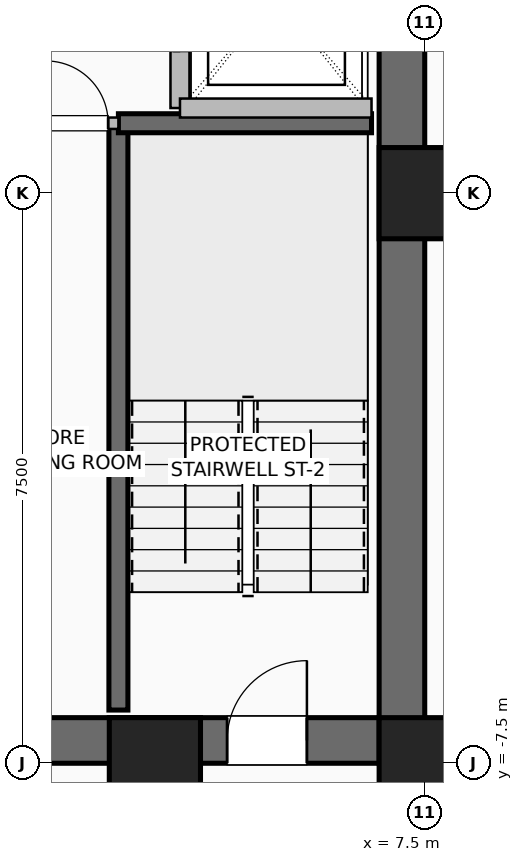
"""IFC4 building model, lengths in metres.
Left out: names, types, materials, properties, quantities, classifications, styles, units other than length and angle.
Written with IfcOpenShell. Run it as: python <this file> out.ifc"""

import sys

from ifc_helpers import new_model, si_unit, direction, frame, frame_2d, origin, origin_2d, place, context, subcontext, project, spatial, rectangle, hollow_rectangle, extrude, element, fill, save


model = new_model("IFC4")
c1 = context("Model", 3, precision=1e-05, world=origin(), true_north=direction((0.0, 1.0)))
c2 = subcontext(c1, "Body", "Model", "MODEL_VIEW")
j1 = project(units=[si_unit("LENGTHUNIT", "METRE"), si_unit("PLANEANGLEUNIT", "RADIAN")], contexts=[c1])
p1 = place(None, origin())
s1 = spatial("IfcSite", under=j1, at=p1, CompositionType="ELEMENT")
p2 = place(p1, origin())
s2 = spatial("IfcBuilding", under=s1, at=p2, CompositionType="ELEMENT")
p3 = place(p2, frame((0.0, 0.0, 44.5)))
s3 = spatial("IfcBuildingStorey", under=s2, at=p3, CompositionType="ELEMENT", Elevation=44.5)
for number, where, z_axis, x_axis in (
    (1, (3.95, -7.5, 0.0), (0.0, 0.0, 1.0), (1.0, 0.0, 0.0)),
    (2, (7.5, -7.5, 0.0), (0.0, 0.0, 1.0), (1.0, 0.0, 0.0)),
    (3, (7.5, 0.0, 0.0), (0.0, 0.0, 1.0), (1.0, 0.0, 0.0)),
):
    element("IfcColumn", number, at=place(p3, frame(where, z_axis=z_axis, x_axis=x_axis)), inside=s3, PredefinedType="COLUMN", context=c2, shape_type="SweptSolid", body=[
        extrude(hollow_rectangle(XDim=1.2, YDim=1.2, WallThickness=0.055, at=origin_2d()), origin(), (0.0, 0.0, 1.0), 3.5),
    ])
p4 = place(p3, frame((-7.5, -7.2, 0.0), z_axis=(0.0, 0.0, 1.0), x_axis=(1.0, 0.0, 0.0)))
e4 = element("IfcWall", 4, at=p4, inside=s3, PredefinedType="SHEAR", context=c2, shape_type="SweptSolid", body=[
    extrude(rectangle(XDim=15.0, YDim=0.6, at=frame_2d((7.5, 0.0))), origin(), (0.0, 0.0, 1.0), 3.25),
])
p5 = place(p4, frame((1.55, 0.0, 0.0)))
e5 = element("IfcOpeningElement", 5, at=p5, cuts=e4, PredefinedType="OPENING", context=c2, shape_type="SweptSolid", body=[
    extrude(rectangle(XDim=1.05, YDim=2.08, at=frame_2d((0.525, 1.04))), frame((0.0, 0.31, 0.0), z_axis=(0.0, -1.0, 0.0), x_axis=(1.0, 0.0, 0.0)), (0.0, 0.0, 1.0), 0.62),
])
p6 = place(p4, frame((12.4, 0.0, 0.0)))
e6 = element("IfcOpeningElement", 6, at=p6, cuts=e4, PredefinedType="OPENING", context=c2, shape_type="SweptSolid", body=[
    extrude(rectangle(XDim=1.05, YDim=2.08, at=frame_2d((0.525, 1.04))), frame((0.0, 0.31, 0.0), z_axis=(0.0, -1.0, 0.0), x_axis=(1.0, 0.0, 0.0)), (0.0, 0.0, 1.0), 0.62),
])
p7 = place(p4, frame((4.64, 0.0, 0.0)))
e7 = element("IfcOpeningElement", 7, at=p7, cuts=e4, PredefinedType="OPENING", context=c2, shape_type="SweptSolid", body=[
    extrude(rectangle(XDim=1.1, YDim=2.2, at=frame_2d((0.55, 1.1))), frame((0.0, 0.31, 0.0), z_axis=(0.0, -1.0, 0.0), x_axis=(1.0, 0.0, 0.0)), (0.0, 0.0, 1.0), 0.62),
])
p8 = place(p4, frame((6.52, 0.0, 0.0)))
e8 = element("IfcOpeningElement", 8, at=p8, cuts=e4, PredefinedType="OPENING", context=c2, shape_type="SweptSolid", body=[
    extrude(rectangle(XDim=1.1, YDim=2.2, at=frame_2d((0.55, 1.1))), frame((0.0, 0.31, 0.0), z_axis=(0.0, -1.0, 0.0), x_axis=(1.0, 0.0, 0.0)), (0.0, 0.0, 1.0), 0.62),
])
p9 = place(p4, frame((8.4, 0.0, 0.0)))
e9 = element("IfcOpeningElement", 9, at=p9, cuts=e4, PredefinedType="OPENING", context=c2, shape_type="SweptSolid", body=[
    extrude(rectangle(XDim=1.1, YDim=2.2, at=frame_2d((0.55, 1.1))), frame((0.0, 0.31, 0.0), z_axis=(0.0, -1.0, 0.0), x_axis=(1.0, 0.0, 0.0)), (0.0, 0.0, 1.0), 0.62),
])
p10 = place(p3, frame((7.2, -7.5, 0.0), z_axis=(0.0, 0.0, 1.0), x_axis=(0.0, 1.0, 0.0)))
e10 = element("IfcWall", 10, at=p10, inside=s3, PredefinedType="SHEAR", context=c2, shape_type="SweptSolid", body=[
    extrude(rectangle(XDim=15.0, YDim=0.6, at=frame_2d((7.5, 0.0))), origin(), (0.0, 0.0, 1.0), 3.25),
])
p11 = place(p3, frame((3.47, -6.8, 0.0), z_axis=(0.0, 0.0, 1.0), x_axis=(0.0, 1.0, 0.0)))
e11 = element("IfcWall", 11, at=p11, inside=s3, PredefinedType="SHEAR", context=c2, shape_type="SweptSolid", body=[
    extrude(rectangle(XDim=7.72, YDim=0.25, at=frame_2d((3.86, 0.0))), origin(), (0.0, 0.0, 1.0), 3.25),
])
p12 = place(p3, frame((3.47, 0.92, 0.0), z_axis=(0.0, 0.0, 1.0), x_axis=(1.0, 0.0, 0.0)))
e12 = element("IfcWall", 12, at=p12, inside=s3, PredefinedType="SHEAR", context=c2, shape_type="SweptSolid", body=[
    extrude(rectangle(XDim=3.33, YDim=0.25, at=frame_2d((1.665, 0.0))), origin(), (0.0, 0.0, 1.0), 3.25),
])
p13 = place(p3, frame((4.28, 1.12, 0.0), z_axis=(0.0, 0.0, 1.0), x_axis=(0.0, 1.0, 0.0)))
e13 = element("IfcWall", 13, at=p13, inside=s3, PredefinedType="SHEAR", context=c2, shape_type="SweptSolid", body=[
    extrude(rectangle(XDim=2.9, YDim=0.25, at=frame_2d((1.45, 0.0))), origin(), (0.0, 0.0, 1.0), 3.25),
])
p14 = place(p13, frame((0.75, 0.0, 0.0)))
e14 = element("IfcOpeningElement", 14, at=p14, cuts=e13, PredefinedType="OPENING", context=c2, shape_type="SweptSolid", body=[
    extrude(rectangle(XDim=1.3, YDim=2.3, at=frame_2d((0.65, 1.15))), frame((0.0, 0.135, 0.0), z_axis=(0.0, -1.0, 0.0), x_axis=(1.0, 0.0, 0.0)), (0.0, 0.0, 1.0), 0.27),
])
p15 = place(p3, frame((4.28, 1.12, 0.0), z_axis=(0.0, 0.0, 1.0), x_axis=(1.0, 0.0, 0.0)))
e15 = element("IfcWall", 15, at=p15, inside=s3, PredefinedType="SHEAR", context=c2, shape_type="SweptSolid", body=[
    extrude(rectangle(XDim=2.52, YDim=0.25, at=frame_2d((1.26, 0.0))), origin(), (0.0, 0.0, 1.0), 3.25),
])
p16 = place(p3, frame((2.38, 0.92, 0.0), z_axis=(0.0, 0.0, 1.0), x_axis=(1.0, 0.0, 0.0)))
e16 = element("IfcWall", 16, at=p16, inside=s3, PredefinedType="PARTITIONING", context=c2, shape_type="SweptSolid", body=[
    extrude(rectangle(XDim=1.09, YDim=0.15, at=frame_2d((0.545, 0.0))), origin(), (0.0, 0.0, 1.0), 3.25),
])
p17 = place(p16, frame((0.135, 0.0, 0.0)))
e17 = element("IfcOpeningElement", 17, at=p17, cuts=e16, PredefinedType="OPENING", context=c2, shape_type="SweptSolid", body=[
    extrude(rectangle(XDim=0.82, YDim=2.05, at=frame_2d((0.41, 1.025))), frame((0.0, 0.085, 0.0), z_axis=(0.0, -1.0, 0.0), x_axis=(1.0, 0.0, 0.0)), (0.0, 0.0, 1.0), 0.17),
])
p18 = place(p6, origin())
e18 = element("IfcDoor", 18, at=p18, inside=s3, OperationType="SINGLE_SWING_RIGHT", PredefinedType="DOOR", context=c2, shape_type="SweptSolid", body=[
    extrude(rectangle(XDim=1.05, YDim=2.08, at=frame_2d((0.525, 1.04))), frame((0.0, 0.025, 0.0), z_axis=(0.0, -1.0, 0.0), x_axis=(1.0, 0.0, 0.0)), (0.0, 0.0, 1.0), 0.05),
])
fill(e6, e18)
p19 = place(p17, origin())
e19 = element("IfcDoor", 19, at=p19, inside=s3, OperationType="SINGLE_SWING_LEFT", PredefinedType="DOOR", context=c2, shape_type="SweptSolid", body=[
    extrude(rectangle(XDim=0.82, YDim=2.05, at=frame_2d((0.41, 1.025))), frame((0.0, 0.025, 0.0), z_axis=(0.0, -1.0, 0.0), x_axis=(1.0, 0.0, 0.0)), (0.0, 0.0, 1.0), 0.05),
])
fill(e17, e19)
save(model, sys.argv[1])
